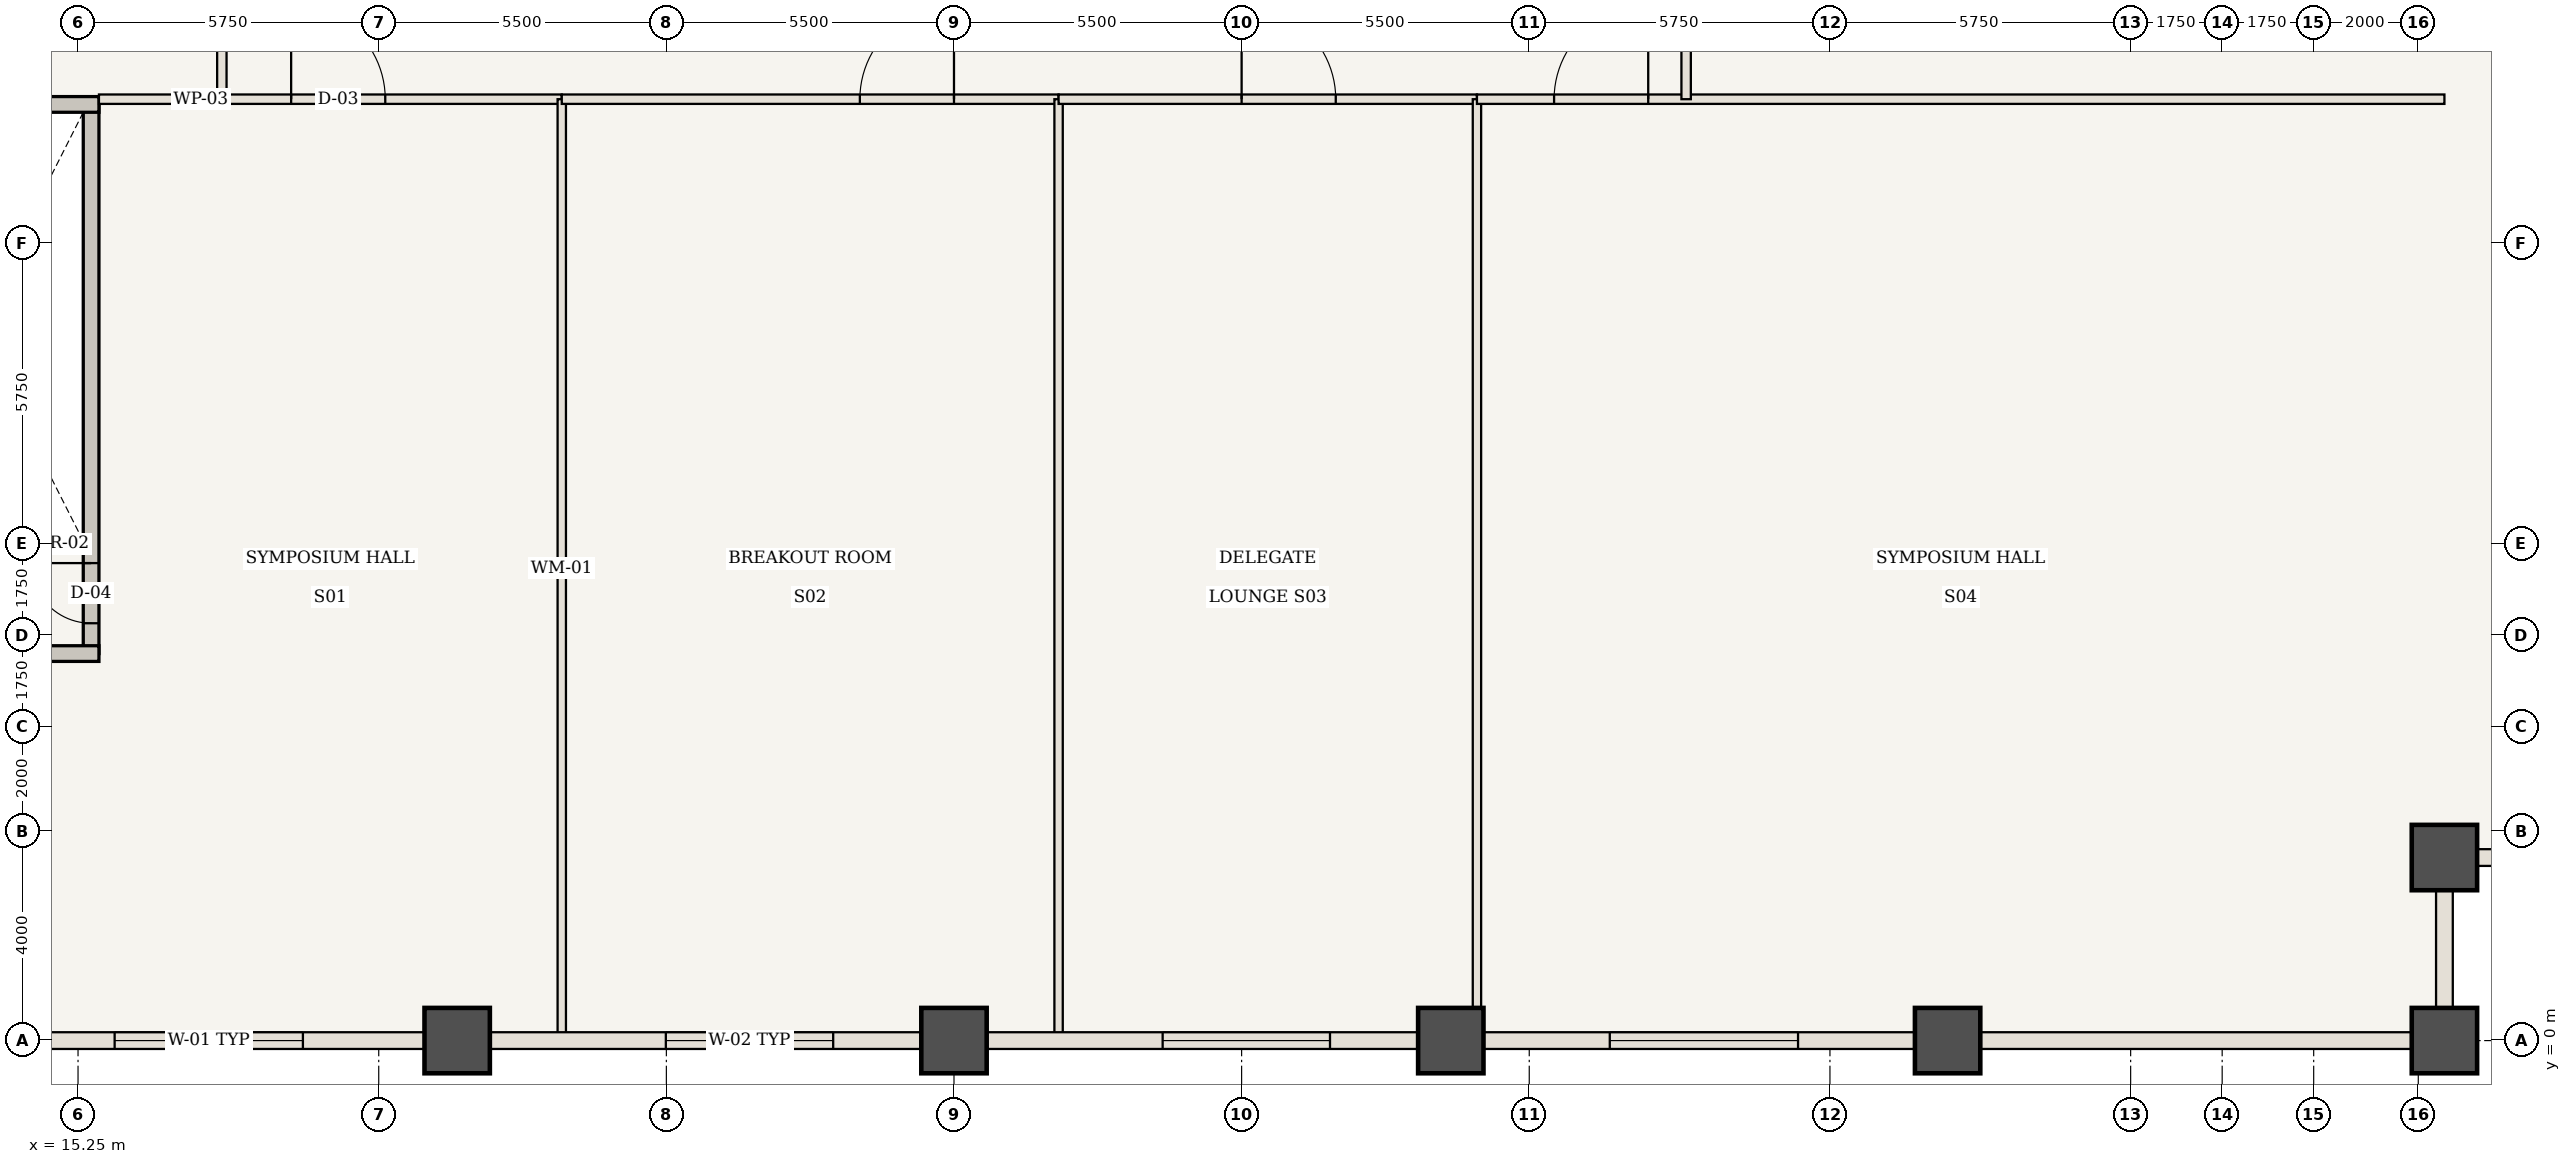
"""IFC4 building model, lengths in metres.
Left out: names, types, materials, properties, quantities, classifications, styles, units other than length and angle.
Written with IfcOpenShell. Run it as: python <this file> out.ifc"""

import sys

from ifc_helpers import new_model, si_unit, direction, frame, frame_2d, origin, origin_2d, place, context, subcontext, project, spatial, rectangle, extrude, element, fill, save


model = new_model("IFC4")
c1 = context("Model", 3, precision=1e-05, world=origin(), true_north=direction((0.0, 1.0)))
c2 = subcontext(c1, "Body", "Model", "MODEL_VIEW")
j1 = project(units=[si_unit("LENGTHUNIT", "METRE"), si_unit("PLANEANGLEUNIT", "RADIAN")], contexts=[c1])
p1 = place(None, origin())
s1 = spatial("IfcSite", under=j1, at=p1, CompositionType="ELEMENT")
p2 = place(p1, origin())
s2 = spatial("IfcBuilding", under=s1, at=p2, CompositionType="ELEMENT")
p3 = place(p2, frame((0.0, 0.0, 29.4)))
s3 = spatial("IfcBuildingStorey", under=s2, at=p3, CompositionType="ELEMENT", Elevation=29.4)
for number, where, z_axis, x_axis in (
    (1, (60.5, 0.0, 0.0), (0.0, 0.0, 1.0), (1.0, 0.0, 0.0)),
    (2, (60.5, 3.5, 0.0), (0.0, 0.0, 1.0), (1.0, 0.0, 0.0)),
    (3, (22.5, 0.0, 0.0), (0.0, 0.0, 1.0), (1.0, 0.0, 0.0)),
    (4, (32.0, 0.0, 0.0), (0.0, 0.0, 1.0), (1.0, 0.0, 0.0)),
    (5, (41.5, 0.0, 0.0), (0.0, 0.0, 1.0), (1.0, 0.0, 0.0)),
    (6, (51.0, 0.0, 0.0), (0.0, 0.0, 1.0), (1.0, 0.0, 0.0)),
):
    element("IfcColumn", number, at=place(p3, frame(where, z_axis=z_axis, x_axis=x_axis)), inside=s3, PredefinedType="COLUMN", context=c2, shape_type="SweptSolid", body=[
        extrude(rectangle(XDim=1.25, YDim=1.25, at=origin_2d()), origin(), (0.0, 0.0, 1.0), 4.48),
    ])
p4 = place(p3, frame((15.5, 7.4, 0.0), z_axis=(0.0, 0.0, 1.0), x_axis=(0.0, 1.0, 0.0)))
e7 = element("IfcWall", 7, at=p4, inside=s3, PredefinedType="SHEAR", context=c2, shape_type="SweptSolid", body=[
    extrude(rectangle(XDim=10.5, YDim=0.3, at=frame_2d((5.25, 0.0))), origin(), (0.0, 0.0, 1.0), 4.48),
])
p5 = place(p4, frame((0.58, 0.0, 0.0)))
e8 = element("IfcOpeningElement", 8, at=p5, cuts=e7, PredefinedType="OPENING", context=c2, shape_type="SweptSolid", body=[
    extrude(rectangle(XDim=1.15, YDim=2.15, at=frame_2d((0.575, 1.075))), frame((0.0, 0.16, 0.0), z_axis=(0.0, -1.0, 0.0), x_axis=(1.0, 0.0, 0.0)), (0.0, 0.0, 1.0), 0.32),
])
for number, where, z_axis, x_axis in (
    (9, (10.9, 7.4, 0.0), (0.0, 0.0, 1.0), (1.0, 0.0, 0.0)),
    (10, (10.9, 17.9, 0.0), (0.0, 0.0, 1.0), (1.0, 0.0, 0.0)),
):
    element("IfcWall", number, at=place(p3, frame(where, z_axis=z_axis, x_axis=x_axis)), inside=s3, PredefinedType="SHEAR", context=c2, shape_type="SweptSolid", body=[
        extrude(rectangle(XDim=4.75, YDim=0.3, at=frame_2d((2.375, 0.0))), origin(), (0.0, 0.0, 1.0), 4.48),
    ])
p6 = place(p3, frame((15.65, 18.0, 0.0), z_axis=(0.0, 0.0, 1.0), x_axis=(1.0, 0.0, 0.0)))
e11 = element("IfcWall", 11, at=p6, inside=s3, PredefinedType="STANDARD", context=c2, shape_type="SweptSolid", body=[
    extrude(rectangle(XDim=8.85, YDim=0.18, at=frame_2d((4.425, 0.0))), origin(), (0.0, 0.0, 1.0), 4.48),
])
p7 = place(p6, frame((3.675, 0.0, 0.0)))
e12 = element("IfcOpeningElement", 12, at=p7, cuts=e11, PredefinedType="OPENING", context=c2, shape_type="SweptSolid", body=[
    extrude(rectangle(XDim=1.8, YDim=2.35, at=frame_2d((0.9, 1.175))), frame((0.0, 0.1, 0.0), z_axis=(0.0, -1.0, 0.0), x_axis=(1.0, 0.0, 0.0)), (0.0, 0.0, 1.0), 0.2),
])
p8 = place(p3, frame((24.5, 0.06, 0.0), z_axis=(0.0, 0.0, 1.0), x_axis=(0.0, 1.0, 0.0)))
e13 = element("IfcWall", 13, at=p8, inside=s3, PredefinedType="MOVABLE", context=c2, shape_type="SweptSolid", body=[
    extrude(rectangle(XDim=17.94, YDim=0.16, at=frame_2d((8.97, 0.0))), origin(), (0.0, 0.0, 1.0), 4.48),
])
p9 = place(p3, frame((24.5, 18.0, 0.0), z_axis=(0.0, 0.0, 1.0), x_axis=(1.0, 0.0, 0.0)))
e14 = element("IfcWall", 14, at=p9, inside=s3, PredefinedType="STANDARD", context=c2, shape_type="SweptSolid", body=[
    extrude(rectangle(XDim=9.5, YDim=0.18, at=frame_2d((4.75, 0.0))), origin(), (0.0, 0.0, 1.0), 4.48),
])
p10 = place(p9, frame((5.7, 0.0, 0.0)))
e15 = element("IfcOpeningElement", 15, at=p10, cuts=e14, PredefinedType="OPENING", context=c2, shape_type="SweptSolid", body=[
    extrude(rectangle(XDim=1.8, YDim=2.35, at=frame_2d((0.9, 1.175))), frame((0.0, 0.1, 0.0), z_axis=(0.0, -1.0, 0.0), x_axis=(1.0, 0.0, 0.0)), (0.0, 0.0, 1.0), 0.2),
])
p11 = place(p3, frame((34.0, 0.06, 0.0), z_axis=(0.0, 0.0, 1.0), x_axis=(0.0, 1.0, 0.0)))
e16 = element("IfcWall", 16, at=p11, inside=s3, PredefinedType="MOVABLE", context=c2, shape_type="SweptSolid", body=[
    extrude(rectangle(XDim=17.94, YDim=0.16, at=frame_2d((8.97, 0.0))), origin(), (0.0, 0.0, 1.0), 4.48),
])
p12 = place(p3, frame((34.0, 18.0, 0.0), z_axis=(0.0, 0.0, 1.0), x_axis=(1.0, 0.0, 0.0)))
e17 = element("IfcWall", 17, at=p12, inside=s3, PredefinedType="STANDARD", context=c2, shape_type="SweptSolid", body=[
    extrude(rectangle(XDim=8.0, YDim=0.18, at=frame_2d((4.0, 0.0))), origin(), (0.0, 0.0, 1.0), 4.48),
])
p13 = place(p12, frame((3.5, 0.0, 0.0)))
e18 = element("IfcOpeningElement", 18, at=p13, cuts=e17, PredefinedType="OPENING", context=c2, shape_type="SweptSolid", body=[
    extrude(rectangle(XDim=1.8, YDim=2.35, at=frame_2d((0.9, 1.175))), frame((0.0, 0.1, 0.0), z_axis=(0.0, -1.0, 0.0), x_axis=(1.0, 0.0, 0.0)), (0.0, 0.0, 1.0), 0.2),
])
p14 = place(p3, frame((42.0, 0.06, 0.0), z_axis=(0.0, 0.0, 1.0), x_axis=(0.0, 1.0, 0.0)))
e19 = element("IfcWall", 19, at=p14, inside=s3, PredefinedType="MOVABLE", context=c2, shape_type="SweptSolid", body=[
    extrude(rectangle(XDim=17.94, YDim=0.16, at=frame_2d((8.97, 0.0))), origin(), (0.0, 0.0, 1.0), 4.48),
])
p15 = place(p3, frame((42.0, 18.0, 0.0), z_axis=(0.0, 0.0, 1.0), x_axis=(1.0, 0.0, 0.0)))
e20 = element("IfcWall", 20, at=p15, inside=s3, PredefinedType="STANDARD", context=c2, shape_type="SweptSolid", body=[
    extrude(rectangle(XDim=18.5, YDim=0.18, at=frame_2d((9.25, 0.0))), origin(), (0.0, 0.0, 1.0), 4.48),
])
p16 = place(p15, frame((1.475, 0.0, 0.0)))
e21 = element("IfcOpeningElement", 21, at=p16, cuts=e20, PredefinedType="OPENING", context=c2, shape_type="SweptSolid", body=[
    extrude(rectangle(XDim=1.8, YDim=2.35, at=frame_2d((0.9, 1.175))), frame((0.0, 0.1, 0.0), z_axis=(0.0, -1.0, 0.0), x_axis=(1.0, 0.0, 0.0)), (0.0, 0.0, 1.0), 0.2),
])
p17 = place(p3, frame((18.0, 18.0, 0.0), z_axis=(0.0, 0.0, 1.0), x_axis=(0.0, 1.0, 0.0)))
e22 = element("IfcWall", 22, at=p17, inside=s3, PredefinedType="STANDARD", context=c2, shape_type="SweptSolid", body=[
    extrude(rectangle(XDim=13.2, YDim=0.18, at=frame_2d((6.6, 0.0))), origin(), (0.0, 0.0, 1.0), 4.48),
])
p18 = place(p17, frame((6.1, 0.0, 0.0)))
e23 = element("IfcOpeningElement", 23, at=p18, cuts=e22, PredefinedType="OPENING", context=c2, shape_type="SweptSolid", body=[
    extrude(rectangle(XDim=0.95, YDim=2.15, at=frame_2d((0.475, 1.075))), frame((0.0, 0.1, 0.0), z_axis=(0.0, -1.0, 0.0), x_axis=(1.0, 0.0, 0.0)), (0.0, 0.0, 1.0), 0.2),
])
p19 = place(p3, frame((46.0, 18.0, 0.0), z_axis=(0.0, 0.0, 1.0), x_axis=(0.0, 1.0, 0.0)))
e24 = element("IfcWall", 24, at=p19, inside=s3, PredefinedType="STANDARD", context=c2, shape_type="SweptSolid", body=[
    extrude(rectangle(XDim=14.8, YDim=0.18, at=frame_2d((7.4, 0.0))), origin(), (0.0, 0.0, 1.0), 4.48),
])
p20 = place(p19, frame((6.9, 0.0, 0.0)))
e25 = element("IfcOpeningElement", 25, at=p20, cuts=e24, PredefinedType="OPENING", context=c2, shape_type="SweptSolid", body=[
    extrude(rectangle(XDim=0.95, YDim=2.15, at=frame_2d((0.475, 1.075))), frame((0.0, 0.1, 0.0), z_axis=(0.0, -1.0, 0.0), x_axis=(1.0, 0.0, 0.0)), (0.0, 0.0, 1.0), 0.2),
])
p21 = place(p3, frame((22.5, 0.0, 0.0), z_axis=(0.0, 0.0, 1.0), x_axis=(-1.0, 0.0, 0.0)))
e26 = element("IfcWall", 26, at=p21, inside=s3, PredefinedType="USERDEFINED", context=c2, shape_type="SweptSolid", body=[
    extrude(rectangle(XDim=9.5, YDim=0.32, at=frame_2d((4.75, 0.0))), origin(), (0.0, 0.0, 1.0), 2.48),
])
p22 = place(p21, frame((2.95, 0.0, 0.85)))
e27 = element("IfcOpeningElement", 27, at=p22, cuts=e26, PredefinedType="OPENING", context=c2, shape_type="SweptSolid", body=[
    extrude(rectangle(XDim=3.6, YDim=1.43, at=frame_2d((1.8, 0.715))), frame((0.0, 0.17, 0.0), z_axis=(0.0, -1.0, 0.0), x_axis=(1.0, 0.0, 0.0)), (0.0, 0.0, 1.0), 0.34),
])
p23 = place(p3, frame((32.0, 0.0, 0.0), z_axis=(0.0, 0.0, 1.0), x_axis=(-1.0, 0.0, 0.0)))
e28 = element("IfcWall", 28, at=p23, inside=s3, PredefinedType="USERDEFINED", context=c2, shape_type="SweptSolid", body=[
    extrude(rectangle(XDim=9.5, YDim=0.32, at=frame_2d((4.75, 0.0))), origin(), (0.0, 0.0, 1.0), 2.48),
])
p24 = place(p23, frame((2.31, 0.0, 0.85)))
e29 = element("IfcOpeningElement", 29, at=p24, cuts=e28, PredefinedType="OPENING", context=c2, shape_type="SweptSolid", body=[
    extrude(rectangle(XDim=3.2, YDim=1.43, at=frame_2d((1.6, 0.715))), frame((0.0, 0.17, 0.0), z_axis=(0.0, -1.0, 0.0), x_axis=(1.0, 0.0, 0.0)), (0.0, 0.0, 1.0), 0.34),
])
p25 = place(p3, frame((41.5, 0.0, 0.0), z_axis=(0.0, 0.0, 1.0), x_axis=(-1.0, 0.0, 0.0)))
e30 = element("IfcWall", 30, at=p25, inside=s3, PredefinedType="USERDEFINED", context=c2, shape_type="SweptSolid", body=[
    extrude(rectangle(XDim=9.5, YDim=0.32, at=frame_2d((4.75, 0.0))), origin(), (0.0, 0.0, 1.0), 2.48),
])
p26 = place(p25, frame((2.31, 0.0, 0.85)))
e31 = element("IfcOpeningElement", 31, at=p26, cuts=e30, PredefinedType="OPENING", context=c2, shape_type="SweptSolid", body=[
    extrude(rectangle(XDim=3.2, YDim=1.43, at=frame_2d((1.6, 0.715))), frame((0.0, 0.17, 0.0), z_axis=(0.0, -1.0, 0.0), x_axis=(1.0, 0.0, 0.0)), (0.0, 0.0, 1.0), 0.34),
])
p27 = place(p3, frame((51.0, 0.0, 0.0), z_axis=(0.0, 0.0, 1.0), x_axis=(-1.0, 0.0, 0.0)))
e32 = element("IfcWall", 32, at=p27, inside=s3, PredefinedType="USERDEFINED", context=c2, shape_type="SweptSolid", body=[
    extrude(rectangle(XDim=9.5, YDim=0.32, at=frame_2d((4.75, 0.0))), origin(), (0.0, 0.0, 1.0), 2.48),
])
p28 = place(p27, frame((2.86, 0.0, 0.85)))
e33 = element("IfcOpeningElement", 33, at=p28, cuts=e32, PredefinedType="OPENING", context=c2, shape_type="SweptSolid", body=[
    extrude(rectangle(XDim=3.6, YDim=1.43, at=frame_2d((1.8, 0.715))), frame((0.0, 0.17, 0.0), z_axis=(0.0, -1.0, 0.0), x_axis=(1.0, 0.0, 0.0)), (0.0, 0.0, 1.0), 0.34),
])
p29 = place(p3, frame((60.5, 0.0, 0.0), z_axis=(0.0, 0.0, 1.0), x_axis=(-1.0, 0.0, 0.0)))
e34 = element("IfcWall", 34, at=p29, inside=s3, PredefinedType="USERDEFINED", context=c2, shape_type="SweptSolid", body=[
    extrude(rectangle(XDim=9.5, YDim=0.32, at=frame_2d((4.75, 0.0))), origin(), (0.0, 0.0, 1.0), 2.48),
])
for number, where, z_axis, x_axis in (
    (35, (60.5, 3.5, 0.0), (0.0, 0.0, 1.0), (0.0, -1.0, 0.0)),
    (36, (64.0, 3.5, 0.0), (0.0, 0.0, 1.0), (-1.0, 0.0, 0.0)),
):
    element("IfcWall", number, at=place(p3, frame(where, z_axis=z_axis, x_axis=x_axis)), inside=s3, PredefinedType="USERDEFINED", context=c2, shape_type="SweptSolid", body=[
        extrude(rectangle(XDim=3.5, YDim=0.32, at=frame_2d((1.75, 0.0))), origin(), (0.0, 0.0, 1.0), 2.48),
    ])
p30 = place(p5, origin())
e37 = element("IfcDoor", 37, at=p30, inside=s3, OperationType="SINGLE_SWING_RIGHT", PredefinedType="DOOR", context=c2, shape_type="SweptSolid", body=[
    extrude(rectangle(XDim=1.15, YDim=2.15, at=frame_2d((0.575, 1.075))), frame((0.0, 0.025, 0.0), z_axis=(0.0, -1.0, 0.0), x_axis=(1.0, 0.0, 0.0)), (0.0, 0.0, 1.0), 0.05),
])
fill(e8, e37)
p31 = place(p7, origin())
e38 = element("IfcDoor", 38, at=p31, inside=s3, OperationType="SINGLE_SWING_LEFT", PredefinedType="DOOR", context=c2, shape_type="SweptSolid", body=[
    extrude(rectangle(XDim=1.8, YDim=2.35, at=frame_2d((0.9, 1.175))), frame((0.0, 0.025, 0.0), z_axis=(0.0, -1.0, 0.0), x_axis=(1.0, 0.0, 0.0)), (0.0, 0.0, 1.0), 0.05),
])
fill(e12, e38)
p32 = place(p10, origin())
e39 = element("IfcDoor", 39, at=p32, inside=s3, OperationType="SINGLE_SWING_RIGHT", PredefinedType="DOOR", context=c2, shape_type="SweptSolid", body=[
    extrude(rectangle(XDim=1.8, YDim=2.35, at=frame_2d((0.9, 1.175))), frame((0.0, 0.025, 0.0), z_axis=(0.0, -1.0, 0.0), x_axis=(1.0, 0.0, 0.0)), (0.0, 0.0, 1.0), 0.05),
])
fill(e15, e39)
p33 = place(p13, origin())
e40 = element("IfcDoor", 40, at=p33, inside=s3, OperationType="SINGLE_SWING_LEFT", PredefinedType="DOOR", context=c2, shape_type="SweptSolid", body=[
    extrude(rectangle(XDim=1.8, YDim=2.35, at=frame_2d((0.9, 1.175))), frame((0.0, 0.025, 0.0), z_axis=(0.0, -1.0, 0.0), x_axis=(1.0, 0.0, 0.0)), (0.0, 0.0, 1.0), 0.05),
])
fill(e18, e40)
p34 = place(p16, origin())
e41 = element("IfcDoor", 41, at=p34, inside=s3, OperationType="SINGLE_SWING_RIGHT", PredefinedType="DOOR", context=c2, shape_type="SweptSolid", body=[
    extrude(rectangle(XDim=1.8, YDim=2.35, at=frame_2d((0.9, 1.175))), frame((0.0, 0.025, 0.0), z_axis=(0.0, -1.0, 0.0), x_axis=(1.0, 0.0, 0.0)), (0.0, 0.0, 1.0), 0.05),
])
fill(e21, e41)
p35 = place(p22, origin())
e42 = element("IfcWindow", 42, at=p35, inside=s3, PartitioningType="SINGLE_PANEL", PredefinedType="WINDOW", context=c2, shape_type="SweptSolid", body=[
    extrude(rectangle(XDim=3.6, YDim=1.43, at=frame_2d((1.8, 0.715))), frame((0.0, 0.03, 0.0), z_axis=(0.0, -1.0, 0.0), x_axis=(1.0, 0.0, 0.0)), (0.0, 0.0, 1.0), 0.06),
])
fill(e27, e42)
p36 = place(p24, origin())
e43 = element("IfcWindow", 43, at=p36, inside=s3, PartitioningType="SINGLE_PANEL", PredefinedType="WINDOW", context=c2, shape_type="SweptSolid", body=[
    extrude(rectangle(XDim=3.2, YDim=1.43, at=frame_2d((1.6, 0.715))), frame((0.0, 0.03, 0.0), z_axis=(0.0, -1.0, 0.0), x_axis=(1.0, 0.0, 0.0)), (0.0, 0.0, 1.0), 0.06),
])
fill(e29, e43)
p37 = place(p26, origin())
e44 = element("IfcWindow", 44, at=p37, inside=s3, PartitioningType="SINGLE_PANEL", PredefinedType="WINDOW", context=c2, shape_type="SweptSolid", body=[
    extrude(rectangle(XDim=3.2, YDim=1.43, at=frame_2d((1.6, 0.715))), frame((0.0, 0.03, 0.0), z_axis=(0.0, -1.0, 0.0), x_axis=(1.0, 0.0, 0.0)), (0.0, 0.0, 1.0), 0.06),
])
fill(e31, e44)
p38 = place(p28, origin())
e45 = element("IfcWindow", 45, at=p38, inside=s3, PartitioningType="SINGLE_PANEL", PredefinedType="WINDOW", context=c2, shape_type="SweptSolid", body=[
    extrude(rectangle(XDim=3.6, YDim=1.43, at=frame_2d((1.8, 0.715))), frame((0.0, 0.03, 0.0), z_axis=(0.0, -1.0, 0.0), x_axis=(1.0, 0.0, 0.0)), (0.0, 0.0, 1.0), 0.06),
])
fill(e33, e45)
save(model, sys.argv[1])
